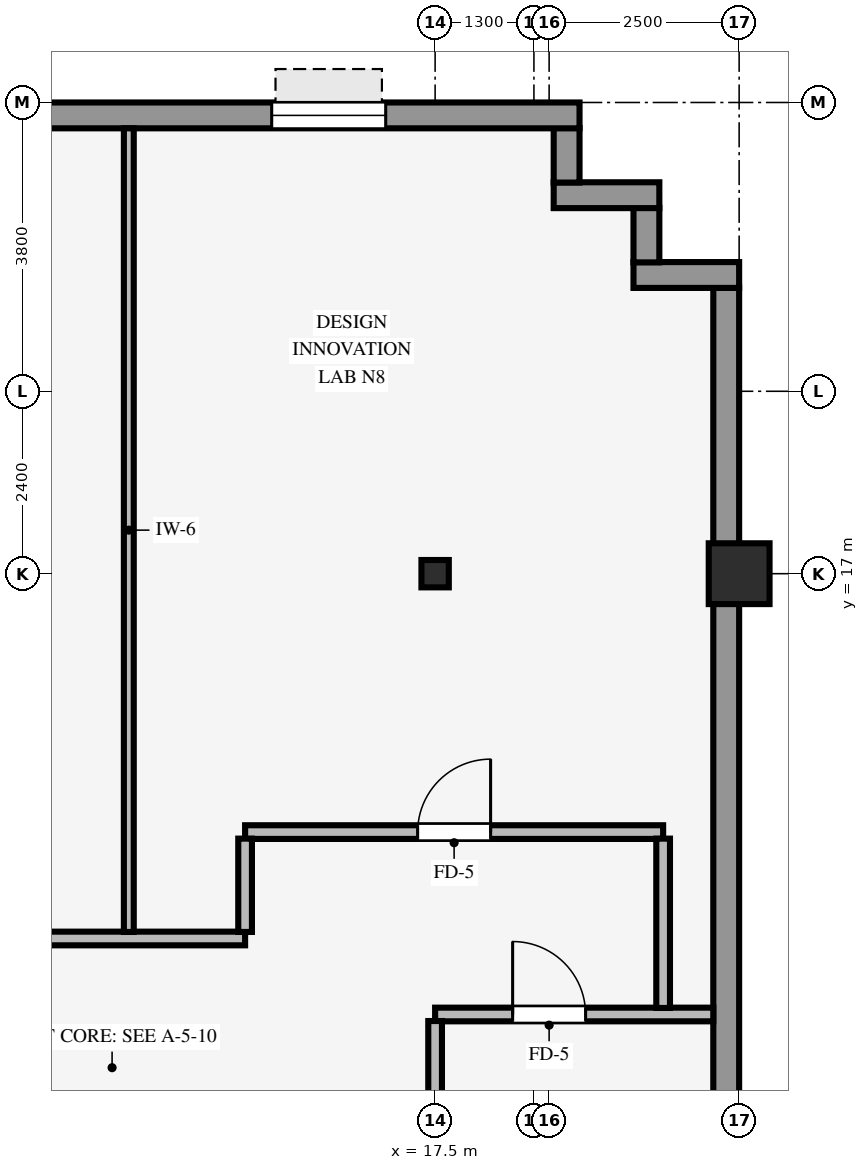
"""IFC4 building model, lengths in metres.
Left out: names, types, materials, properties, quantities, classifications, styles, units other than length and angle.
Written with IfcOpenShell. Run it as: python <this file> out.ifc"""

import sys

from ifc_helpers import new_model, si_unit, direction, frame, frame_2d, origin, origin_2d, place, context, subcontext, project, spatial, rectangle, hollow_rectangle, i_section, extrude, source, transform, mapped, element, fill, save


model = new_model("IFC4")
c1 = context("Model", 3, precision=1e-05, world=origin(), true_north=direction((0.0, 1.0)))
c2 = subcontext(c1, "Body", "Model", "MODEL_VIEW")
j1 = project(units=[si_unit("LENGTHUNIT", "METRE"), si_unit("PLANEANGLEUNIT", "RADIAN")], contexts=[c1])
p1 = place(None, origin())
s1 = spatial("IfcSite", under=j1, at=p1, CompositionType="ELEMENT")
p2 = place(p1, origin())
s2 = spatial("IfcBuilding", under=s1, at=p2, CompositionType="ELEMENT")
p3 = place(p2, frame((0.0, 0.0, 67.75)))
s3 = spatial("IfcBuildingStorey", under=s2, at=p3, CompositionType="ELEMENT", Elevation=67.75)
p4 = place(p3, frame((21.5, 17.0, 0.0), z_axis=(0.0, 0.0, 1.0), x_axis=(1.0, 0.0, 0.0)))
e1 = element("IfcColumn", 1, at=p4, inside=s3, PredefinedType="COLUMN", context=c2, shape_type="SweptSolid", body=[
    extrude(hollow_rectangle(XDim=0.8, YDim=0.8, WallThickness=0.055, InnerFilletRadius=0.055, OuterFilletRadius=0.11, at=origin_2d()), origin(), (0.0, 0.0, 1.0), 3.37),
])
p5 = place(p3, frame((17.5, 17.0, 0.0), z_axis=(0.0, 0.0, 1.0), x_axis=(1.0, 0.0, 0.0)))
e2 = element("IfcColumn", 2, at=p5, inside=s3, PredefinedType="COLUMN", context=c2, shape_type="SweptSolid", body=[
    extrude(i_section(OverallWidth=0.36, OverallDepth=0.36, WebThickness=0.021, FlangeThickness=0.021, FilletRadius=0.018, at=origin_2d()), origin(), (0.0, 0.0, 1.0), 3.37),
])
p6 = place(p3, frame((21.33, -20.764, 0.0), z_axis=(0.0, 0.0, 1.0), x_axis=(0.0, 1.0, 0.0)))
e3 = element("IfcWall", 3, at=p6, inside=s3, PredefinedType="STANDARD", context=c2, shape_type="SweptSolid", body=[
    extrude(rectangle(XDim=41.528, YDim=0.34, at=frame_2d((20.764, 0.0))), origin(), (0.0, 0.0, 1.0), 2.705),
])
p7 = place(p6, frame((12.202, 0.0, 0.8)))
e4 = element("IfcOpeningElement", 4, at=p7, cuts=e3, PredefinedType="OPENING", context=c2, shape_type="SweptSolid", body=[
    extrude(rectangle(XDim=2.3, YDim=1.62, at=frame_2d((1.15, 0.81))), frame((0.0, 0.18, 0.0), z_axis=(0.0, -1.0, 0.0), x_axis=(1.0, 0.0, 0.0)), (0.0, 0.0, 1.0), 0.36),
])
p8 = place(p6, frame((17.144, 0.0, 0.8)))
e5 = element("IfcOpeningElement", 5, at=p8, cuts=e3, PredefinedType="OPENING", context=c2, shape_type="SweptSolid", body=[
    extrude(rectangle(XDim=2.3, YDim=1.62, at=frame_2d((1.15, 0.81))), frame((0.0, 0.18, 0.0), z_axis=(0.0, -1.0, 0.0), x_axis=(1.0, 0.0, 0.0)), (0.0, 0.0, 1.0), 0.36),
])
p9 = place(p6, frame((22.084, 0.0, 0.8)))
e6 = element("IfcOpeningElement", 6, at=p9, cuts=e3, PredefinedType="OPENING", context=c2, shape_type="SweptSolid", body=[
    extrude(rectangle(XDim=2.3, YDim=1.62, at=frame_2d((1.15, 0.81))), frame((0.0, 0.18, 0.0), z_axis=(0.0, -1.0, 0.0), x_axis=(1.0, 0.0, 0.0)), (0.0, 0.0, 1.0), 0.36),
])
p10 = place(p6, frame((27.025, 0.0, 0.8)))
e7 = element("IfcOpeningElement", 7, at=p10, cuts=e3, PredefinedType="OPENING", context=c2, shape_type="SweptSolid", body=[
    extrude(rectangle(XDim=2.3, YDim=1.62, at=frame_2d((1.15, 0.81))), frame((0.0, 0.18, 0.0), z_axis=(0.0, -1.0, 0.0), x_axis=(1.0, 0.0, 0.0)), (0.0, 0.0, 1.0), 0.36),
])
p11 = place(p3, frame((20.11, 20.93, 0.0), z_axis=(0.0, 0.0, 1.0), x_axis=(1.0, 0.0, 0.0)))
e8 = element("IfcWall", 8, at=p11, inside=s3, PredefinedType="STANDARD", context=c2, shape_type="SweptSolid", body=[
    extrude(rectangle(XDim=1.39, YDim=0.34, at=frame_2d((0.695, 0.0))), origin(), (0.0, 0.0, 1.0), 3.36),
])
p12 = place(p3, frame((20.28, 21.096, 0.0), z_axis=(0.0, 0.0, 1.0), x_axis=(0.0, 1.0, 0.0)))
e9 = element("IfcWall", 9, at=p12, inside=s3, PredefinedType="STANDARD", context=c2, shape_type="SweptSolid", body=[
    extrude(rectangle(XDim=0.718, YDim=0.34, at=frame_2d((0.359, 0.0))), origin(), (0.0, 0.0, 1.0), 3.36),
])
p13 = place(p3, frame((19.06, 21.98, 0.0), z_axis=(0.0, 0.0, 1.0), x_axis=(1.0, 0.0, 0.0)))
e10 = element("IfcWall", 10, at=p13, inside=s3, PredefinedType="STANDARD", context=c2, shape_type="SweptSolid", body=[
    extrude(rectangle(XDim=1.39, YDim=0.34, at=frame_2d((0.695, 0.0))), origin(), (0.0, 0.0, 1.0), 3.36),
])
p14 = place(p3, frame((19.23, 22.146, 0.0), z_axis=(0.0, 0.0, 1.0), x_axis=(0.0, 1.0, 0.0)))
e11 = element("IfcWall", 11, at=p14, inside=s3, PredefinedType="STANDARD", context=c2, shape_type="SweptSolid", body=[
    extrude(rectangle(XDim=0.718, YDim=0.34, at=frame_2d((0.359, 0.0))), origin(), (0.0, 0.0, 1.0), 3.36),
])
p15 = place(p3, frame((-19.4, 23.03, 0.0), z_axis=(0.0, 0.0, 1.0), x_axis=(1.0, 0.0, 0.0)))
e12 = element("IfcWall", 12, at=p15, inside=s3, PredefinedType="STANDARD", context=c2, shape_type="SweptSolid", body=[
    extrude(rectangle(XDim=38.8, YDim=0.34, at=frame_2d((19.4, 0.0))), origin(), (0.0, 0.0, 1.0), 2.705),
])
p16 = place(p15, frame((1.65, 0.0, 0.8)))
e13 = element("IfcOpeningElement", 13, at=p16, cuts=e12, PredefinedType="OPENING", context=c2, shape_type="SweptSolid", body=[
    extrude(rectangle(XDim=1.5, YDim=1.6, at=frame_2d((0.75, 0.8))), frame((0.0, 0.18, 0.0), z_axis=(0.0, -1.0, 0.0), x_axis=(1.0, 0.0, 0.0)), (0.0, 0.0, 1.0), 0.36),
])
p17 = place(p15, frame((7.15, 0.0, 0.8)))
e14 = element("IfcOpeningElement", 14, at=p17, cuts=e12, PredefinedType="OPENING", context=c2, shape_type="SweptSolid", body=[
    extrude(rectangle(XDim=1.5, YDim=1.6, at=frame_2d((0.75, 0.8))), frame((0.0, 0.18, 0.0), z_axis=(0.0, -1.0, 0.0), x_axis=(1.0, 0.0, 0.0)), (0.0, 0.0, 1.0), 0.36),
])
p18 = place(p15, frame((11.75, 0.0, 0.8)))
e15 = element("IfcOpeningElement", 15, at=p18, cuts=e12, PredefinedType="OPENING", context=c2, shape_type="SweptSolid", body=[
    extrude(rectangle(XDim=1.5, YDim=1.6, at=frame_2d((0.75, 0.8))), frame((0.0, 0.18, 0.0), z_axis=(0.0, -1.0, 0.0), x_axis=(1.0, 0.0, 0.0)), (0.0, 0.0, 1.0), 0.36),
])
p19 = place(p15, frame((16.35, 0.0, 0.8)))
e16 = element("IfcOpeningElement", 16, at=p19, cuts=e12, PredefinedType="OPENING", context=c2, shape_type="SweptSolid", body=[
    extrude(rectangle(XDim=1.5, YDim=1.6, at=frame_2d((0.75, 0.8))), frame((0.0, 0.18, 0.0), z_axis=(0.0, -1.0, 0.0), x_axis=(1.0, 0.0, 0.0)), (0.0, 0.0, 1.0), 0.36),
])
p20 = place(p15, frame((20.95, 0.0, 0.8)))
e17 = element("IfcOpeningElement", 17, at=p20, cuts=e12, PredefinedType="OPENING", context=c2, shape_type="SweptSolid", body=[
    extrude(rectangle(XDim=1.5, YDim=1.6, at=frame_2d((0.75, 0.8))), frame((0.0, 0.18, 0.0), z_axis=(0.0, -1.0, 0.0), x_axis=(1.0, 0.0, 0.0)), (0.0, 0.0, 1.0), 0.36),
])
p21 = place(p15, frame((25.55, 0.0, 0.8)))
e18 = element("IfcOpeningElement", 18, at=p21, cuts=e12, PredefinedType="OPENING", context=c2, shape_type="SweptSolid", body=[
    extrude(rectangle(XDim=1.5, YDim=1.6, at=frame_2d((0.75, 0.8))), frame((0.0, 0.18, 0.0), z_axis=(0.0, -1.0, 0.0), x_axis=(1.0, 0.0, 0.0)), (0.0, 0.0, 1.0), 0.36),
])
p22 = place(p15, frame((30.15, 0.0, 0.8)))
e19 = element("IfcOpeningElement", 19, at=p22, cuts=e12, PredefinedType="OPENING", context=c2, shape_type="SweptSolid", body=[
    extrude(rectangle(XDim=1.5, YDim=1.6, at=frame_2d((0.75, 0.8))), frame((0.0, 0.18, 0.0), z_axis=(0.0, -1.0, 0.0), x_axis=(1.0, 0.0, 0.0)), (0.0, 0.0, 1.0), 0.36),
])
p23 = place(p15, frame((34.75, 0.0, 0.8)))
e20 = element("IfcOpeningElement", 20, at=p23, cuts=e12, PredefinedType="OPENING", context=c2, shape_type="SweptSolid", body=[
    extrude(rectangle(XDim=1.5, YDim=1.6, at=frame_2d((0.75, 0.8))), frame((0.0, 0.18, 0.0), z_axis=(0.0, -1.0, 0.0), x_axis=(1.0, 0.0, 0.0)), (0.0, 0.0, 1.0), 0.36),
])
p24 = place(p3, frame((17.5, 11.2, 0.0), z_axis=(0.0, 0.0, 1.0), x_axis=(1.0, 0.0, 0.0)))
e21 = element("IfcWall", 21, at=p24, inside=s3, PredefinedType="PARTITIONING", context=c2, shape_type="SweptSolid", body=[
    extrude(rectangle(XDim=3.66, YDim=0.18, at=frame_2d((1.83, 0.0))), origin(), (0.0, 0.0, 1.0), 3.36),
])
p25 = place(p24, frame((1.02, 0.0, 0.0)))
e22 = element("IfcOpeningElement", 22, at=p25, cuts=e21, PredefinedType="OPENING", context=c2, shape_type="SweptSolid", body=[
    extrude(rectangle(XDim=0.96, YDim=2.1, at=frame_2d((0.48, 1.05))), frame((0.0, 0.1, 0.0), z_axis=(0.0, -1.0, 0.0), x_axis=(1.0, 0.0, 0.0)), (0.0, 0.0, 1.0), 0.2),
])
p26 = place(p3, frame((-15.0, 12.2, 0.0), z_axis=(0.0, 0.0, 1.0), x_axis=(1.0, 0.0, 0.0)))
e23 = element("IfcWall", 23, at=p26, inside=s3, PredefinedType="PARTITIONING", context=c2, shape_type="SweptSolid", body=[
    extrude(rectangle(XDim=30.0, YDim=0.18, at=frame_2d((15.0, 0.0))), origin(), (0.0, 0.0, 1.0), 3.36),
])
p27 = place(p26, frame((2.195, 0.0, 0.0)))
e24 = element("IfcOpeningElement", 24, at=p27, cuts=e23, PredefinedType="OPENING", context=c2, shape_type="SweptSolid", body=[
    extrude(rectangle(XDim=0.96, YDim=2.1, at=frame_2d((0.48, 1.05))), frame((0.0, 0.1, 0.0), z_axis=(0.0, -1.0, 0.0), x_axis=(1.0, 0.0, 0.0)), (0.0, 0.0, 1.0), 0.2),
])
p28 = place(p26, frame((16.395, 0.0, 0.0)))
e25 = element("IfcOpeningElement", 25, at=p28, cuts=e23, PredefinedType="OPENING", context=c2, shape_type="SweptSolid", body=[
    extrude(rectangle(XDim=0.96, YDim=2.1, at=frame_2d((0.48, 1.05))), frame((0.0, 0.1, 0.0), z_axis=(0.0, -1.0, 0.0), x_axis=(1.0, 0.0, 0.0)), (0.0, 0.0, 1.0), 0.2),
])
p29 = place(p26, frame((21.62, 0.0, 0.0)))
e26 = element("IfcOpeningElement", 26, at=p29, cuts=e23, PredefinedType="OPENING", context=c2, shape_type="SweptSolid", body=[
    extrude(rectangle(XDim=0.96, YDim=2.1, at=frame_2d((0.48, 1.05))), frame((0.0, 0.1, 0.0), z_axis=(0.0, -1.0, 0.0), x_axis=(1.0, 0.0, 0.0)), (0.0, 0.0, 1.0), 0.2),
])
p30 = place(p26, frame((7.33, 0.0, 0.0)))
e27 = element("IfcOpeningElement", 27, at=p30, cuts=e23, PredefinedType="OPENING", context=c2, shape_type="SweptSolid", body=[
    extrude(rectangle(XDim=0.96, YDim=2.1, at=frame_2d((0.48, 1.05))), frame((0.0, 0.1, 0.0), z_axis=(0.0, -1.0, 0.0), x_axis=(1.0, 0.0, 0.0)), (0.0, 0.0, 1.0), 0.2),
])
p31 = place(p26, frame((26.08, 0.0, 0.0)))
e28 = element("IfcOpeningElement", 28, at=p31, cuts=e23, PredefinedType="OPENING", context=c2, shape_type="SweptSolid", body=[
    extrude(rectangle(XDim=0.96, YDim=2.1, at=frame_2d((0.48, 1.05))), frame((0.0, 0.1, 0.0), z_axis=(0.0, -1.0, 0.0), x_axis=(1.0, 0.0, 0.0)), (0.0, 0.0, 1.0), 0.2),
])
p32 = place(p26, frame((12.52, 0.0, 0.0)))
e29 = element("IfcOpeningElement", 29, at=p32, cuts=e23, PredefinedType="OPENING", context=c2, shape_type="SweptSolid", body=[
    extrude(rectangle(XDim=0.96, YDim=2.1, at=frame_2d((0.48, 1.05))), frame((0.0, 0.1, 0.0), z_axis=(0.0, -1.0, 0.0), x_axis=(1.0, 0.0, 0.0)), (0.0, 0.0, 1.0), 0.2),
])
p33 = place(p3, frame((15.0, 13.6, 0.0), z_axis=(0.0, 0.0, 1.0), x_axis=(1.0, 0.0, 0.0)))
e30 = element("IfcWall", 30, at=p33, inside=s3, PredefinedType="PARTITIONING", context=c2, shape_type="SweptSolid", body=[
    extrude(rectangle(XDim=5.5, YDim=0.18, at=frame_2d((2.75, 0.0))), origin(), (0.0, 0.0, 1.0), 2.942),
])
p34 = place(p33, frame((2.27, 0.0, 0.0)))
e31 = element("IfcOpeningElement", 31, at=p34, cuts=e30, PredefinedType="OPENING", context=c2, shape_type="SweptSolid", body=[
    extrude(rectangle(XDim=0.96, YDim=2.1, at=frame_2d((0.48, 1.05))), frame((0.0, 0.1, 0.0), z_axis=(0.0, -1.0, 0.0), x_axis=(1.0, 0.0, 0.0)), (0.0, 0.0, 1.0), 0.2),
])
p35 = place(p3, frame((13.47, 12.286, 0.0), z_axis=(0.0, 0.0, 1.0), x_axis=(0.0, 1.0, 0.0)))
e32 = element("IfcWall", 32, at=p35, inside=s3, PredefinedType="PARTITIONING", context=c2, shape_type="SweptSolid", body=[
    extrude(rectangle(XDim=10.574, YDim=0.13, at=frame_2d((5.287, 0.0))), origin(), (0.0, 0.0, 1.0), 3.36),
])
p36 = place(p3, frame((15.0, 12.286, 0.0), z_axis=(0.0, 0.0, 1.0), x_axis=(0.0, 1.0, 0.0)))
e33 = element("IfcWall", 33, at=p36, inside=s3, PredefinedType="PARTITIONING", context=c2, shape_type="SweptSolid", body=[
    extrude(rectangle(XDim=1.228, YDim=0.18, at=frame_2d((0.614, 0.0))), origin(), (0.0, 0.0, 1.0), 3.36),
])
p37 = place(p3, frame((17.5, 10.146, 0.0), z_axis=(0.0, 0.0, 1.0), x_axis=(0.0, 1.0, 0.0)))
e34 = element("IfcWall", 34, at=p37, inside=s3, PredefinedType="PARTITIONING", context=c2, shape_type="SweptSolid", body=[
    extrude(rectangle(XDim=0.968, YDim=0.18, at=frame_2d((0.484, 0.0))), origin(), (0.0, 0.0, 1.0), 2.738),
])
p38 = place(p3, frame((20.5, 11.286, 0.0), z_axis=(0.0, 0.0, 1.0), x_axis=(0.0, 1.0, 0.0)))
e35 = element("IfcWall", 35, at=p38, inside=s3, PredefinedType="PARTITIONING", context=c2, shape_type="SweptSolid", body=[
    extrude(rectangle(XDim=2.228, YDim=0.18, at=frame_2d((1.114, 0.0))), origin(), (0.0, 0.0, 1.0), 3.36),
])
m1 = source(origin(), c2, "Body", "SweptSolid", [
    extrude(rectangle(XDim=1.5, YDim=1.6, at=frame_2d((0.75, 0.8))), frame((0.0, 0.03, 0.0), z_axis=(0.0, -1.0, 0.0), x_axis=(1.0, 0.0, 0.0)), (0.0, 0.0, 1.0), 0.06),
])
p39 = place(p23, origin())
e36 = element("IfcWindow", 36, at=p39, inside=s3, PartitioningType="SINGLE_PANEL", PredefinedType="WINDOW", context=c2, shape_type="MappedRepresentation", body=[
    mapped(m1, transform((0.0, 0.0, 0.0), scale=1.0)),
])
fill(e20, e36)
m2 = source(origin(), c2, "Body", "SweptSolid", [
    extrude(rectangle(XDim=0.96, YDim=2.1, at=frame_2d((0.48, 1.05))), frame((0.0, 0.025, 0.0), z_axis=(0.0, -1.0, 0.0), x_axis=(1.0, 0.0, 0.0)), (0.0, 0.0, 1.0), 0.05),
])
p40 = place(p34, origin())
e37 = element("IfcDoor", 37, at=p40, inside=s3, OperationType="SINGLE_SWING_RIGHT", PredefinedType="DOOR", context=c2, shape_type="MappedRepresentation", body=[
    mapped(m2, transform((0.0, 0.0, 0.0), scale=1.0)),
])
fill(e31, e37)
p41 = place(p25, origin())
e38 = element("IfcDoor", 38, at=p41, inside=s3, OperationType="SINGLE_SWING_LEFT", PredefinedType="DOOR", context=c2, shape_type="MappedRepresentation", body=[
    mapped(m2, transform((0.0, 0.0, 0.0), scale=1.0)),
])
fill(e22, e38)
save(model, sys.argv[1])
